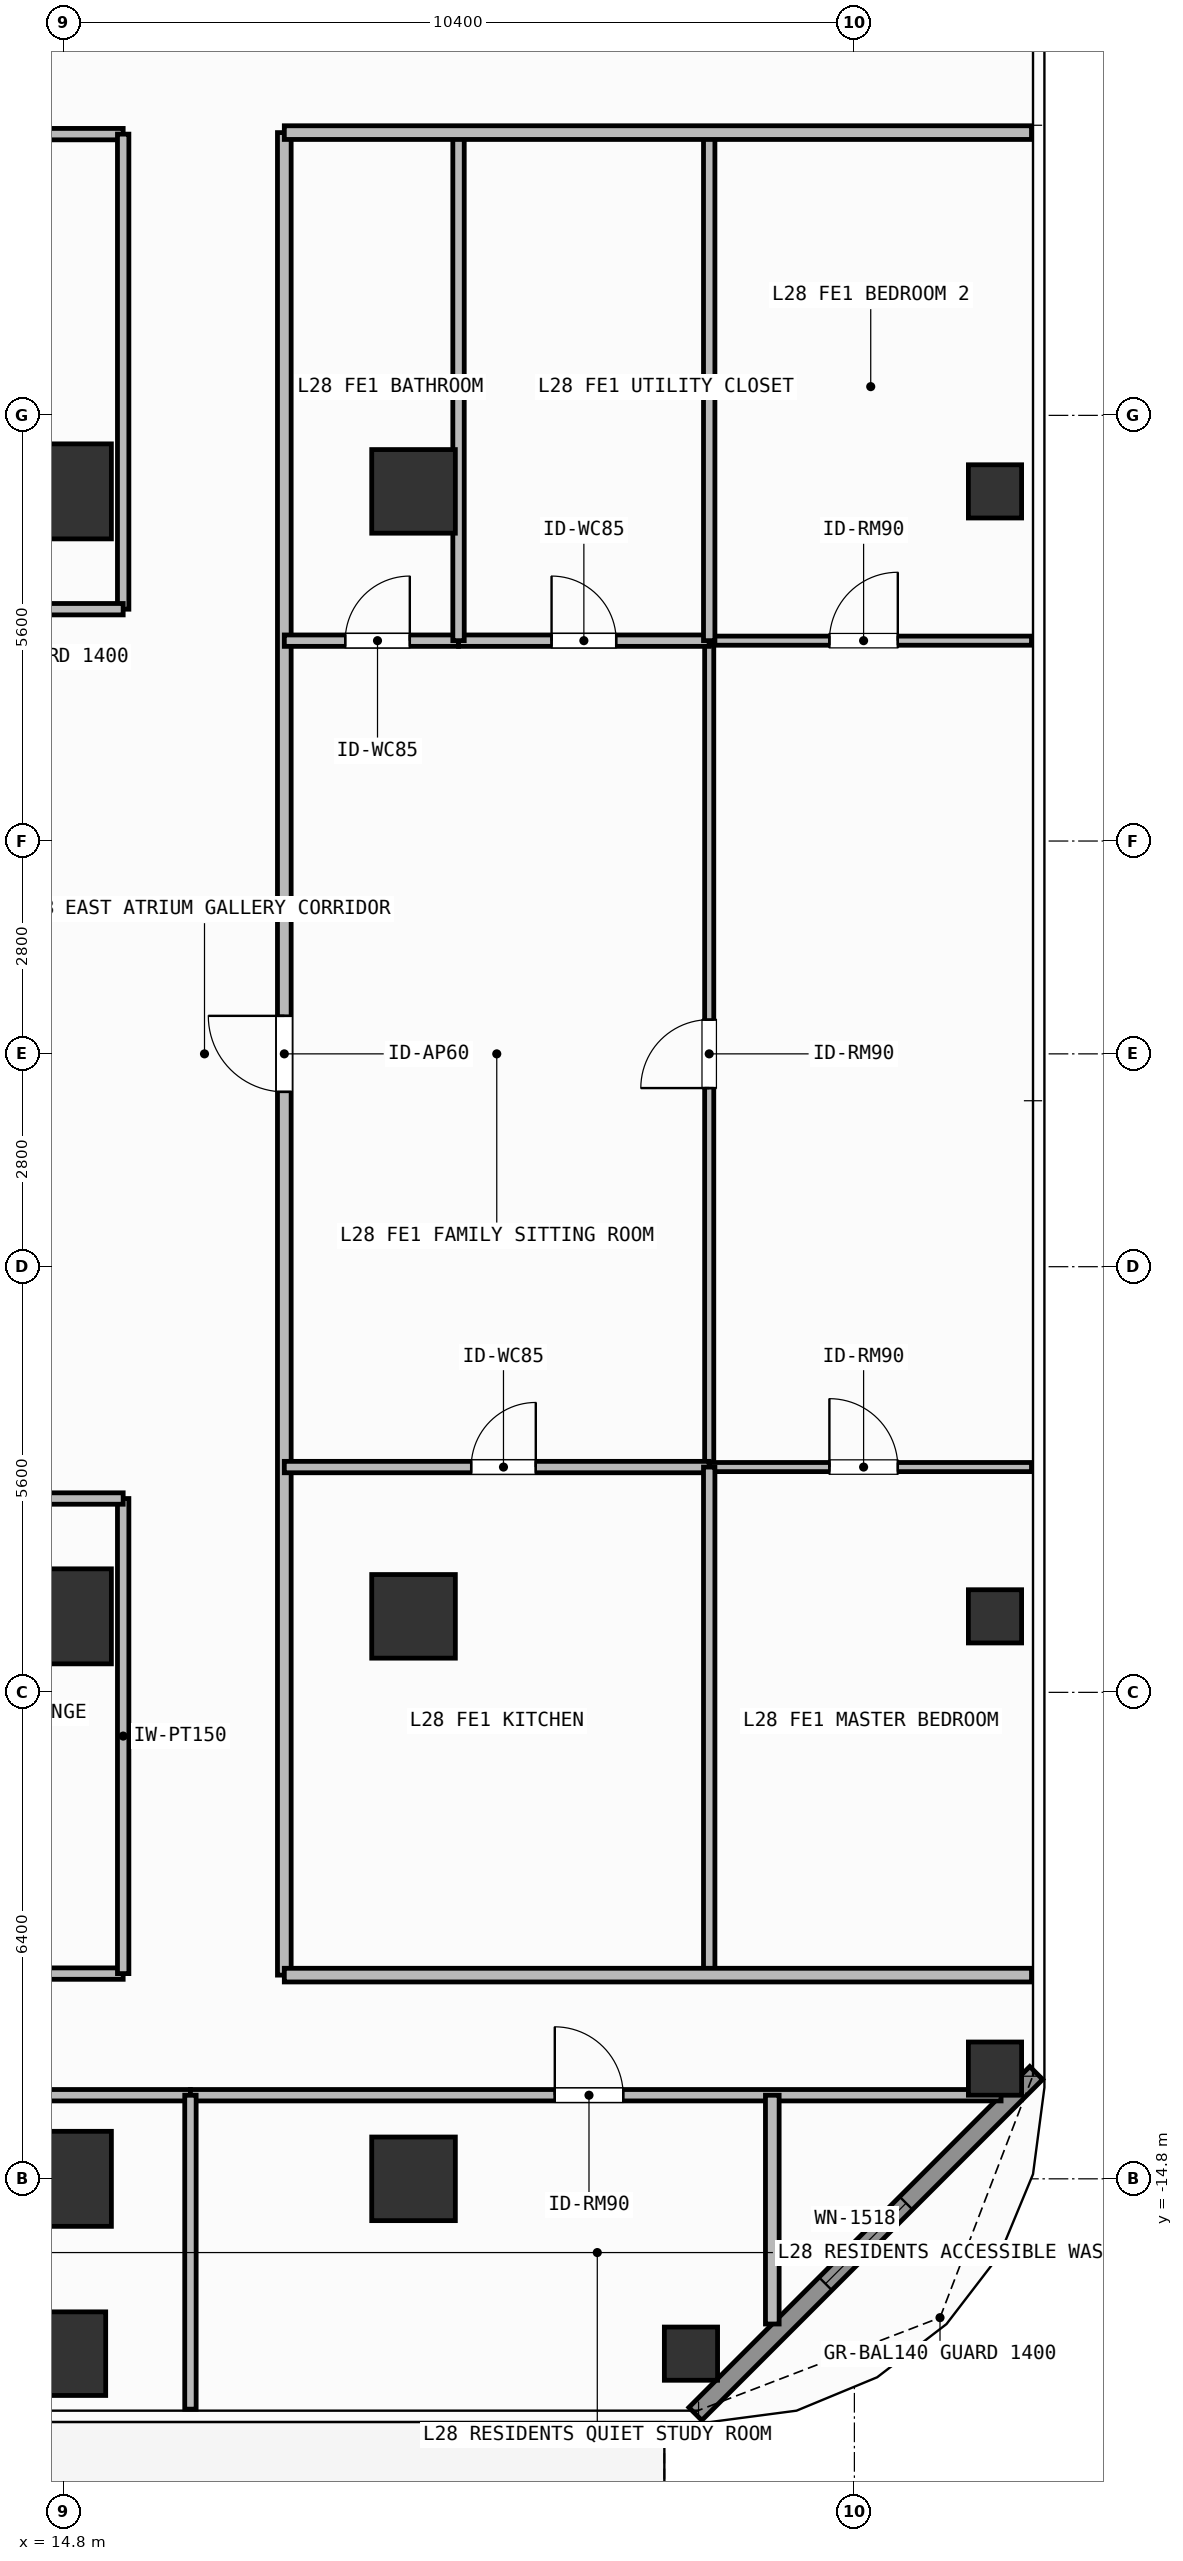
"""IFC4 building model, lengths in metres.
Left out: names, types, materials, properties, quantities, classifications, styles, units other than length and angle.
Written with IfcOpenShell. Run it as: python <this file> out.ifc"""

import sys

from ifc_helpers import new_model, si_unit, direction, frame, frame_2d, origin, origin_2d, place, context, subcontext, project, spatial, rectangle, hollow_rectangle, extrude, element, fill, save


model = new_model("IFC4")
c1 = context("Model", 3, precision=1e-05, world=origin(), true_north=direction((0.0, 1.0)))
c2 = subcontext(c1, "Body", "Model", "MODEL_VIEW")
j1 = project(units=[si_unit("LENGTHUNIT", "METRE"), si_unit("PLANEANGLEUNIT", "RADIAN")], contexts=[c1])
p1 = place(None, origin())
s1 = spatial("IfcSite", under=j1, at=p1, CompositionType="ELEMENT")
p2 = place(p1, origin())
s2 = spatial("IfcBuilding", under=s1, at=p2, CompositionType="ELEMENT")
p3 = place(p2, frame((0.0, 0.0, 113.4)))
s3 = spatial("IfcBuildingStorey", under=s2, at=p3, CompositionType="ELEMENT", Elevation=113.4)
for number, where, z_axis, x_axis in (
    (1, (14.8, -14.8, 0.0), (0.0, 0.0, 1.0), (1.0, 0.0, 0.0)),
    (2, (14.8, -7.4, 0.0), (0.0, 0.0, 1.0), (1.0, 0.0, 0.0)),
    (3, (14.8, 7.4, 0.0), (0.0, 0.0, 1.0), (1.0, 0.0, 0.0)),
):
    element("IfcColumn", number, at=place(p3, frame(where, z_axis=z_axis, x_axis=x_axis)), inside=s3, PredefinedType="COLUMN", context=c2, shape_type="SweptSolid", body=[
        extrude(rectangle(XDim=1.25, YDim=1.25, at=origin_2d()), origin(), (0.0, 0.0, 1.0), 3.9),
    ])
for number, where, z_axis, x_axis in (
    (4, (19.4, -14.8, 0.0), (0.0, 0.0, 1.0), (1.0, 0.0, 0.0)),
    (5, (19.4, -7.4, 0.0), (0.0, 0.0, 1.0), (1.0, 0.0, 0.0)),
    (6, (19.4, 7.4, 0.0), (0.0, 0.0, 1.0), (1.0, 0.0, 0.0)),
    (7, (14.8, -17.1, 0.0), (0.0, 0.0, 1.0), (1.0, 0.0, 0.0)),
):
    element("IfcColumn", number, at=place(p3, frame(where, z_axis=z_axis, x_axis=x_axis)), inside=s3, PredefinedType="COLUMN", context=c2, shape_type="SweptSolid", body=[
        extrude(rectangle(XDim=1.1, YDim=1.1, at=origin_2d()), origin(), (0.0, 0.0, 1.0), 3.9),
    ])
for number, where, z_axis, x_axis in (
    (8, (23.05, -17.1, 0.0), (0.0, 0.0, 1.0), (1.0, 0.0, 0.0)),
    (9, (27.05, -13.35, 0.0), (0.0, 0.0, 1.0), (1.0, 0.0, 0.0)),
    (10, (27.05, -7.4, 0.0), (0.0, 0.0, 1.0), (1.0, 0.0, 0.0)),
    (11, (27.05, 7.4, 0.0), (0.0, 0.0, 1.0), (1.0, 0.0, 0.0)),
):
    element("IfcColumn", number, at=place(p3, frame(where, z_axis=z_axis, x_axis=x_axis)), inside=s3, PredefinedType="COLUMN", context=c2, shape_type="SweptSolid", body=[
        extrude(hollow_rectangle(XDim=0.7, YDim=0.7, WallThickness=0.032, at=origin_2d()), origin(), (0.0, 0.0, 1.0), 3.9),
    ])
p4 = place(p3, frame((27.592, -13.408, 0.0), z_axis=(0.0, 0.0, 1.0), x_axis=(-0.707106781187, -0.707106781187, 0.0)))
e12 = element("IfcWall", 12, at=p4, inside=s3, PredefinedType="SOLIDWALL", context=c2, shape_type="SweptSolid", body=[
    extrude(rectangle(XDim=6.342, YDim=0.24, at=frame_2d((3.171, 0.0))), origin(), (0.0, 0.0, 1.0), 3.68),
])
p5 = place(p4, frame((2.421, 0.0, 0.8)))
e13 = element("IfcOpeningElement", 13, at=p5, cuts=e12, PredefinedType="OPENING", context=c2, shape_type="SweptSolid", body=[
    extrude(rectangle(XDim=1.5, YDim=1.85, at=frame_2d((0.75, 0.925))), frame((0.0, 0.13, 0.0), z_axis=(0.0, -1.0, 0.0), x_axis=(1.0, 0.0, 0.0)), (0.0, 0.0, 1.0), 0.26),
])
p6 = place(p3, frame((10.1, -12.1, 0.0), z_axis=(0.0, 0.0, 1.0), x_axis=(1.0, 0.0, 0.0)))
e14 = element("IfcWall", 14, at=p6, inside=s3, PredefinedType="PARTITIONING", context=c2, shape_type="SweptSolid", body=[
    extrude(rectangle(XDim=5.48, YDim=0.15, at=frame_2d((2.74, 0.0))), origin(), (0.0, 0.0, 1.0), 3.68),
])
p7 = place(p6, frame((2.29, 0.0, 0.0)))
e15 = element("IfcOpeningElement", 15, at=p7, cuts=e14, PredefinedType="OPENING", context=c2, shape_type="SweptSolid", body=[
    extrude(rectangle(XDim=0.9, YDim=2.1, at=frame_2d((0.45, 1.05))), frame((0.0, 0.085, 0.0), z_axis=(0.0, -1.0, 0.0), x_axis=(1.0, 0.0, 0.0)), (0.0, 0.0, 1.0), 0.17),
])
p8 = place(p3, frame((8.36, 12.1, 0.0), z_axis=(0.0, 0.0, 1.0), x_axis=(1.0, 0.0, 0.0)))
e16 = element("IfcWall", 16, at=p8, inside=s3, PredefinedType="PARTITIONING", context=c2, shape_type="SweptSolid", body=[
    extrude(rectangle(XDim=7.22, YDim=0.15, at=frame_2d((3.61, 0.0))), origin(), (0.0, 0.0, 1.0), 3.68),
])
p9 = place(p8, frame((3.513, 0.0, 0.0)))
e17 = element("IfcOpeningElement", 17, at=p9, cuts=e16, PredefinedType="OPENING", context=c2, shape_type="SweptSolid", body=[
    extrude(rectangle(XDim=0.9, YDim=2.1, at=frame_2d((0.45, 1.05))), frame((0.0, 0.085, 0.0), z_axis=(0.0, -1.0, 0.0), x_axis=(1.0, 0.0, 0.0)), (0.0, 0.0, 1.0), 0.17),
])
p10 = place(p3, frame((5.761, -13.7, 0.0), z_axis=(0.0, 0.0, 1.0), x_axis=(1.0, 0.0, 0.0)))
e18 = element("IfcWall", 18, at=p10, inside=s3, PredefinedType="PARTITIONING", context=c2, shape_type="SweptSolid", body=[
    extrude(rectangle(XDim=10.704, YDim=0.15, at=frame_2d((5.352, 0.0))), origin(), (0.0, 0.0, 1.0), 3.68),
])
p11 = place(p10, frame((4.812, 0.0, 0.0)))
e19 = element("IfcOpeningElement", 19, at=p11, cuts=e18, PredefinedType="OPENING", context=c2, shape_type="SweptSolid", body=[
    extrude(rectangle(XDim=0.9, YDim=2.1, at=frame_2d((0.45, 1.05))), frame((0.0, 0.085, 0.0), z_axis=(0.0, -1.0, 0.0), x_axis=(1.0, 0.0, 0.0)), (0.0, 0.0, 1.0), 0.17),
])
p12 = place(p3, frame((16.465, -13.7, 0.0), z_axis=(0.0, 0.0, 1.0), x_axis=(1.0, 0.0, 0.0)))
e20 = element("IfcWall", 20, at=p12, inside=s3, PredefinedType="PARTITIONING", context=c2, shape_type="SweptSolid", body=[
    extrude(rectangle(XDim=10.665, YDim=0.15, at=frame_2d((5.333, 0.0))), origin(), (0.0, 0.0, 1.0), 3.68),
])
p13 = place(p12, frame((4.793, 0.0, 0.0)))
e21 = element("IfcOpeningElement", 21, at=p13, cuts=e20, PredefinedType="OPENING", context=c2, shape_type="SweptSolid", body=[
    extrude(rectangle(XDim=0.9, YDim=2.1, at=frame_2d((0.45, 1.05))), frame((0.0, 0.085, 0.0), z_axis=(0.0, -1.0, 0.0), x_axis=(1.0, 0.0, 0.0)), (0.0, 0.0, 1.0), 0.17),
])
p14 = place(p3, frame((17.7, -12.12, 0.0), z_axis=(0.0, 0.0, 1.0), x_axis=(0.0, 1.0, 0.0)))
e22 = element("IfcWall", 22, at=p14, inside=s3, PredefinedType="PARTITIONING", context=c2, shape_type="SweptSolid", body=[
    extrude(rectangle(XDim=24.24, YDim=0.18, at=frame_2d((12.12, 0.0))), origin(), (0.0, 0.0, 1.0), 3.68),
])
p15 = place(p14, frame((11.62, 0.0, 0.0)))
e23 = element("IfcOpeningElement", 23, at=p15, cuts=e22, PredefinedType="OPENING", context=c2, shape_type="SweptSolid", body=[
    extrude(rectangle(XDim=1.0, YDim=2.2, at=frame_2d((0.5, 1.1))), frame((0.0, 0.1, 0.0), z_axis=(0.0, -1.0, 0.0), x_axis=(1.0, 0.0, 0.0)), (0.0, 0.0, 1.0), 0.2),
])
p16 = place(p3, frame((23.29, -5.436, 0.0), z_axis=(0.0, 0.0, 1.0), x_axis=(0.0, 1.0, 0.0)))
e24 = element("IfcWall", 24, at=p16, inside=s3, PredefinedType="PARTITIONING", context=c2, shape_type="SweptSolid", body=[
    extrude(rectangle(XDim=10.872, YDim=0.12, at=frame_2d((5.436, 0.0))), origin(), (0.0, 0.0, 1.0), 3.68),
])
p17 = place(p16, frame((4.986, 0.0, 0.0)))
e25 = element("IfcOpeningElement", 25, at=p17, cuts=e24, PredefinedType="OPENING", context=c2, shape_type="SweptSolid", body=[
    extrude(rectangle(XDim=0.9, YDim=2.1, at=frame_2d((0.45, 1.05))), frame((0.0, 0.07, 0.0), z_axis=(0.0, -1.0, 0.0), x_axis=(1.0, 0.0, 0.0)), (0.0, 0.0, 1.0), 0.14),
])
p18 = place(p3, frame((17.7, 5.436, 0.0), z_axis=(0.0, 0.0, 1.0), x_axis=(1.0, 0.0, 0.0)))
e26 = element("IfcWall", 26, at=p18, inside=s3, PredefinedType="PARTITIONING", context=c2, shape_type="SweptSolid", body=[
    extrude(rectangle(XDim=2.292, YDim=0.15, at=frame_2d((1.146, 0.0))), origin(), (0.0, 0.0, 1.0), 3.68),
])
p19 = place(p18, frame((0.801, 0.0, 0.0)))
e27 = element("IfcOpeningElement", 27, at=p19, cuts=e26, PredefinedType="OPENING", context=c2, shape_type="SweptSolid", body=[
    extrude(rectangle(XDim=0.85, YDim=2.1, at=frame_2d((0.425, 1.05))), frame((0.0, 0.085, 0.0), z_axis=(0.0, -1.0, 0.0), x_axis=(1.0, 0.0, 0.0)), (0.0, 0.0, 1.0), 0.17),
])
p20 = place(p3, frame((19.992, 5.436, 0.0), z_axis=(0.0, 0.0, 1.0), x_axis=(1.0, 0.0, 0.0)))
e28 = element("IfcWall", 28, at=p20, inside=s3, PredefinedType="PARTITIONING", context=c2, shape_type="SweptSolid", body=[
    extrude(rectangle(XDim=3.298, YDim=0.15, at=frame_2d((1.649, 0.0))), origin(), (0.0, 0.0, 1.0), 3.68),
])
p21 = place(p20, frame((1.224, 0.0, 0.0)))
e29 = element("IfcOpeningElement", 29, at=p21, cuts=e28, PredefinedType="OPENING", context=c2, shape_type="SweptSolid", body=[
    extrude(rectangle(XDim=0.85, YDim=2.1, at=frame_2d((0.425, 1.05))), frame((0.0, 0.085, 0.0), z_axis=(0.0, -1.0, 0.0), x_axis=(1.0, 0.0, 0.0)), (0.0, 0.0, 1.0), 0.17),
])
p22 = place(p3, frame((17.7, -5.436, 0.0), z_axis=(0.0, 0.0, 1.0), x_axis=(1.0, 0.0, 0.0)))
e30 = element("IfcWall", 30, at=p22, inside=s3, PredefinedType="PARTITIONING", context=c2, shape_type="SweptSolid", body=[
    extrude(rectangle(XDim=5.59, YDim=0.15, at=frame_2d((2.795, 0.0))), origin(), (0.0, 0.0, 1.0), 3.68),
])
p23 = place(p22, frame((2.458, 0.0, 0.0)))
e31 = element("IfcOpeningElement", 31, at=p23, cuts=e30, PredefinedType="OPENING", context=c2, shape_type="SweptSolid", body=[
    extrude(rectangle(XDim=0.85, YDim=2.1, at=frame_2d((0.425, 1.05))), frame((0.0, 0.085, 0.0), z_axis=(0.0, -1.0, 0.0), x_axis=(1.0, 0.0, 0.0)), (0.0, 0.0, 1.0), 0.17),
])
p24 = place(p3, frame((23.29, -5.436, 0.0), z_axis=(0.0, 0.0, 1.0), x_axis=(1.0, 0.0, 0.0)))
e32 = element("IfcWall", 32, at=p24, inside=s3, PredefinedType="PARTITIONING", context=c2, shape_type="SweptSolid", body=[
    extrude(rectangle(XDim=4.24, YDim=0.12, at=frame_2d((2.12, 0.0))), origin(), (0.0, 0.0, 1.0), 3.68),
])
p25 = place(p24, frame((1.581, 0.0, 0.0)))
e33 = element("IfcOpeningElement", 33, at=p25, cuts=e32, PredefinedType="OPENING", context=c2, shape_type="SweptSolid", body=[
    extrude(rectangle(XDim=0.9, YDim=2.1, at=frame_2d((0.45, 1.05))), frame((0.0, 0.07, 0.0), z_axis=(0.0, -1.0, 0.0), x_axis=(1.0, 0.0, 0.0)), (0.0, 0.0, 1.0), 0.14),
])
p26 = place(p3, frame((23.29, 5.436, 0.0), z_axis=(0.0, 0.0, 1.0), x_axis=(1.0, 0.0, 0.0)))
e34 = element("IfcWall", 34, at=p26, inside=s3, PredefinedType="PARTITIONING", context=c2, shape_type="SweptSolid", body=[
    extrude(rectangle(XDim=4.24, YDim=0.12, at=frame_2d((2.12, 0.0))), origin(), (0.0, 0.0, 1.0), 3.68),
])
p27 = place(p26, frame((1.581, 0.0, 0.0)))
e35 = element("IfcOpeningElement", 35, at=p27, cuts=e34, PredefinedType="OPENING", context=c2, shape_type="SweptSolid", body=[
    extrude(rectangle(XDim=0.9, YDim=2.1, at=frame_2d((0.45, 1.05))), frame((0.0, 0.07, 0.0), z_axis=(0.0, -1.0, 0.0), x_axis=(1.0, 0.0, 0.0)), (0.0, 0.0, 1.0), 0.14),
])
p28 = place(p3, frame((15.58, -12.1, 0.0), z_axis=(0.0, 0.0, 1.0), x_axis=(0.0, 1.0, 0.0)))
e36 = element("IfcWall", 36, at=p28, inside=s3, PredefinedType="PARTITIONING", context=c2, shape_type="SweptSolid", body=[
    extrude(rectangle(XDim=6.25, YDim=0.15, at=frame_2d((3.125, 0.0))), origin(), (0.0, 0.0, 1.0), 3.68),
])
p29 = place(p3, frame((8.96, -5.85, 0.0), z_axis=(0.0, 0.0, 1.0), x_axis=(1.0, 0.0, 0.0)))
e37 = element("IfcWall", 37, at=p29, inside=s3, PredefinedType="PARTITIONING", context=c2, shape_type="SweptSolid", body=[
    extrude(rectangle(XDim=6.62, YDim=0.15, at=frame_2d((3.31, 0.0))), origin(), (0.0, 0.0, 1.0), 3.68),
])
p30 = place(p3, frame((15.58, 5.85, 0.0), z_axis=(0.0, 0.0, 1.0), x_axis=(0.0, 1.0, 0.0)))
e38 = element("IfcWall", 38, at=p30, inside=s3, PredefinedType="PARTITIONING", context=c2, shape_type="SweptSolid", body=[
    extrude(rectangle(XDim=6.25, YDim=0.15, at=frame_2d((3.125, 0.0))), origin(), (0.0, 0.0, 1.0), 3.68),
])
p31 = place(p3, frame((8.96, 5.85, 0.0), z_axis=(0.0, 0.0, 1.0), x_axis=(1.0, 0.0, 0.0)))
e39 = element("IfcWall", 39, at=p31, inside=s3, PredefinedType="PARTITIONING", context=c2, shape_type="SweptSolid", body=[
    extrude(rectangle(XDim=6.62, YDim=0.15, at=frame_2d((3.31, 0.0))), origin(), (0.0, 0.0, 1.0), 3.68),
])
p32 = place(p3, frame((24.12, -16.71, 0.0), z_axis=(0.0, 0.0, 1.0), x_axis=(0.0, 1.0, 0.0)))
e40 = element("IfcWall", 40, at=p32, inside=s3, PredefinedType="PARTITIONING", context=c2, shape_type="SweptSolid", body=[
    extrude(rectangle(XDim=3.01, YDim=0.18, at=frame_2d((1.505, 0.0))), origin(), (0.0, 0.0, 1.0), 3.68),
])
p33 = place(p3, frame((16.465, -17.83, 0.0), z_axis=(0.0, 0.0, 1.0), x_axis=(0.0, 1.0, 0.0)))
e41 = element("IfcWall", 41, at=p33, inside=s3, PredefinedType="PARTITIONING", context=c2, shape_type="SweptSolid", body=[
    extrude(rectangle(XDim=4.13, YDim=0.15, at=frame_2d((2.065, 0.0))), origin(), (0.0, 0.0, 1.0), 3.68),
])
for number, where, z_axis, x_axis in (
    (42, (19.992, 5.436, 0.0), (0.0, 0.0, 1.0), (0.0, 1.0, 0.0)),
    (43, (23.29, -12.12, 0.0), (0.0, 0.0, 1.0), (0.0, 1.0, 0.0)),
    (44, (23.29, 5.436, 0.0), (0.0, 0.0, 1.0), (0.0, 1.0, 0.0)),
):
    element("IfcWall", number, at=place(p3, frame(where, z_axis=z_axis, x_axis=x_axis)), inside=s3, PredefinedType="PARTITIONING", context=c2, shape_type="SweptSolid", body=[
        extrude(rectangle(XDim=6.684, YDim=0.15, at=frame_2d((3.342, 0.0))), origin(), (0.0, 0.0, 1.0), 3.68),
    ])
for number, where, z_axis, x_axis in (
    (45, (17.7, -12.12, 0.0), (0.0, 0.0, 1.0), (1.0, 0.0, 0.0)),
    (46, (17.7, 12.12, 0.0), (0.0, 0.0, 1.0), (1.0, 0.0, 0.0)),
):
    element("IfcWall", number, at=place(p3, frame(where, z_axis=z_axis, x_axis=x_axis)), inside=s3, PredefinedType="PARTITIONING", context=c2, shape_type="SweptSolid", body=[
        extrude(rectangle(XDim=9.83, YDim=0.18, at=frame_2d((4.915, 0.0))), origin(), (0.0, 0.0, 1.0), 3.68),
    ])
p34 = place(p5, origin())
e47 = element("IfcWindow", 47, at=p34, inside=s3, PartitioningType="SINGLE_PANEL", PredefinedType="WINDOW", context=c2, shape_type="SweptSolid", body=[
    extrude(rectangle(XDim=1.5, YDim=1.85, at=frame_2d((0.75, 0.925))), frame((0.0, 0.03, 0.0), z_axis=(0.0, -1.0, 0.0), x_axis=(1.0, 0.0, 0.0)), (0.0, 0.0, 1.0), 0.06),
])
fill(e13, e47)
p35 = place(p13, origin())
e48 = element("IfcDoor", 48, at=p35, inside=s3, OperationType="SINGLE_SWING_LEFT", PredefinedType="DOOR", context=c2, shape_type="SweptSolid", body=[
    extrude(rectangle(XDim=0.9, YDim=2.1, at=frame_2d((0.45, 1.05))), frame((0.0, 0.025, 0.0), z_axis=(0.0, -1.0, 0.0), x_axis=(1.0, 0.0, 0.0)), (0.0, 0.0, 1.0), 0.05),
])
fill(e21, e48)
p36 = place(p15, origin())
e49 = element("IfcDoor", 49, at=p36, inside=s3, OperationType="SINGLE_SWING_RIGHT", PredefinedType="DOOR", context=c2, shape_type="SweptSolid", body=[
    extrude(rectangle(XDim=1.0, YDim=2.2, at=frame_2d((0.5, 1.1))), frame((0.0, 0.025, 0.0), z_axis=(0.0, -1.0, 0.0), x_axis=(1.0, 0.0, 0.0)), (0.0, 0.0, 1.0), 0.05),
])
fill(e23, e49)
p37 = place(p17, origin())
e50 = element("IfcDoor", 50, at=p37, inside=s3, OperationType="SINGLE_SWING_LEFT", PredefinedType="DOOR", context=c2, shape_type="SweptSolid", body=[
    extrude(rectangle(XDim=0.9, YDim=2.1, at=frame_2d((0.45, 1.05))), frame((0.0, 0.025, 0.0), z_axis=(0.0, -1.0, 0.0), x_axis=(1.0, 0.0, 0.0)), (0.0, 0.0, 1.0), 0.05),
])
fill(e25, e50)
p38 = place(p19, origin())
e51 = element("IfcDoor", 51, at=p38, inside=s3, OperationType="SINGLE_SWING_RIGHT", PredefinedType="DOOR", context=c2, shape_type="SweptSolid", body=[
    extrude(rectangle(XDim=0.85, YDim=2.1, at=frame_2d((0.425, 1.05))), frame((0.0, 0.025, 0.0), z_axis=(0.0, -1.0, 0.0), x_axis=(1.0, 0.0, 0.0)), (0.0, 0.0, 1.0), 0.05),
])
fill(e27, e51)
p39 = place(p21, origin())
e52 = element("IfcDoor", 52, at=p39, inside=s3, OperationType="SINGLE_SWING_LEFT", PredefinedType="DOOR", context=c2, shape_type="SweptSolid", body=[
    extrude(rectangle(XDim=0.85, YDim=2.1, at=frame_2d((0.425, 1.05))), frame((0.0, 0.025, 0.0), z_axis=(0.0, -1.0, 0.0), x_axis=(1.0, 0.0, 0.0)), (0.0, 0.0, 1.0), 0.05),
])
fill(e29, e52)
p40 = place(p23, origin())
e53 = element("IfcDoor", 53, at=p40, inside=s3, OperationType="SINGLE_SWING_RIGHT", PredefinedType="DOOR", context=c2, shape_type="SweptSolid", body=[
    extrude(rectangle(XDim=0.85, YDim=2.1, at=frame_2d((0.425, 1.05))), frame((0.0, 0.025, 0.0), z_axis=(0.0, -1.0, 0.0), x_axis=(1.0, 0.0, 0.0)), (0.0, 0.0, 1.0), 0.05),
])
fill(e31, e53)
p41 = place(p25, origin())
e54 = element("IfcDoor", 54, at=p41, inside=s3, OperationType="SINGLE_SWING_LEFT", PredefinedType="DOOR", context=c2, shape_type="SweptSolid", body=[
    extrude(rectangle(XDim=0.9, YDim=2.1, at=frame_2d((0.45, 1.05))), frame((0.0, 0.025, 0.0), z_axis=(0.0, -1.0, 0.0), x_axis=(1.0, 0.0, 0.0)), (0.0, 0.0, 1.0), 0.05),
])
fill(e33, e54)
p42 = place(p27, origin())
e55 = element("IfcDoor", 55, at=p42, inside=s3, OperationType="SINGLE_SWING_RIGHT", PredefinedType="DOOR", context=c2, shape_type="SweptSolid", body=[
    extrude(rectangle(XDim=0.9, YDim=2.1, at=frame_2d((0.45, 1.05))), frame((0.0, 0.025, 0.0), z_axis=(0.0, -1.0, 0.0), x_axis=(1.0, 0.0, 0.0)), (0.0, 0.0, 1.0), 0.05),
])
fill(e35, e55)
save(model, sys.argv[1])
